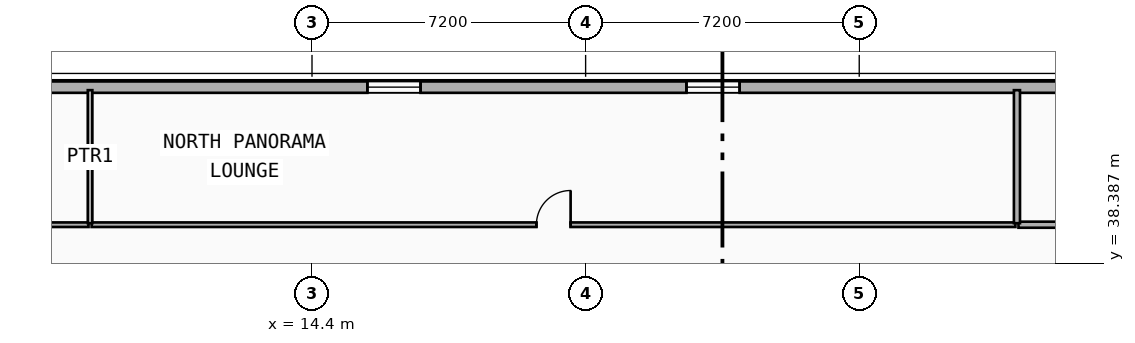
"""IFC4 building model, lengths in metres.
Left out: names, types, materials, properties, quantities, classifications, styles, units other than length and angle.
Written with IfcOpenShell. Run it as: python <this file> out.ifc"""

import sys

from ifc_helpers import new_model, si_unit, direction, frame, frame_2d, origin, place, context, subcontext, project, spatial, rectangle, extrude, element, fill, save


model = new_model("IFC4")
c1 = context("Model", 3, precision=1e-05, world=origin(), true_north=direction((0.0, 1.0)))
c2 = subcontext(c1, "Body", "Model", "MODEL_VIEW")
j1 = project(units=[si_unit("LENGTHUNIT", "METRE"), si_unit("PLANEANGLEUNIT", "RADIAN")], contexts=[c1])
p1 = place(None, origin())
s1 = spatial("IfcSite", under=j1, at=p1, CompositionType="ELEMENT")
p2 = place(p1, origin())
s2 = spatial("IfcBuilding", under=s1, at=p2, CompositionType="ELEMENT")
p3 = place(p2, frame((0.0, 0.0, 104.8)))
s3 = spatial("IfcBuildingStorey", under=s2, at=p3, CompositionType="ELEMENT", Elevation=104.8)
p4 = place(p3, frame((4.2, 43.02, 0.0), z_axis=(0.0, 0.0, 1.0), x_axis=(1.0, 0.0, 0.0)))
e1 = element("IfcWall", 1, at=p4, inside=s3, PredefinedType="SOLIDWALL", context=c2, shape_type="SweptSolid", body=[
    extrude(rectangle(XDim=49.2, YDim=0.3, at=frame_2d((24.6, 0.0))), origin(), (0.0, 0.0, 1.0), 3.24),
])
p5 = place(p4, frame((11.657, 0.0, 0.85)))
e2 = element("IfcOpeningElement", 2, at=p5, cuts=e1, PredefinedType="OPENING", context=c2, shape_type="SweptSolid", body=[
    extrude(rectangle(XDim=1.4, YDim=1.8, at=frame_2d((0.7, 0.9))), frame((0.0, 0.16, 0.0), z_axis=(0.0, -1.0, 0.0), x_axis=(1.0, 0.0, 0.0)), (0.0, 0.0, 1.0), 0.32),
])
p6 = place(p4, frame((20.053, 0.0, 0.85)))
e3 = element("IfcOpeningElement", 3, at=p6, cuts=e1, PredefinedType="OPENING", context=c2, shape_type="SweptSolid", body=[
    extrude(rectangle(XDim=1.4, YDim=1.8, at=frame_2d((0.7, 0.9))), frame((0.0, 0.16, 0.0), z_axis=(0.0, -1.0, 0.0), x_axis=(1.0, 0.0, 0.0)), (0.0, 0.0, 1.0), 0.32),
])
p7 = place(p4, frame((29.789, 0.0, 0.85)))
e4 = element("IfcOpeningElement", 4, at=p7, cuts=e1, PredefinedType="OPENING", context=c2, shape_type="SweptSolid", body=[
    extrude(rectangle(XDim=1.4, YDim=1.8, at=frame_2d((0.7, 0.9))), frame((0.0, 0.16, 0.0), z_axis=(0.0, -1.0, 0.0), x_axis=(1.0, 0.0, 0.0)), (0.0, 0.0, 1.0), 0.32),
])
p8 = place(p4, frame((31.928, 0.0, 0.85)))
e5 = element("IfcOpeningElement", 5, at=p8, cuts=e1, PredefinedType="OPENING", context=c2, shape_type="SweptSolid", body=[
    extrude(rectangle(XDim=1.4, YDim=1.8, at=frame_2d((0.7, 0.9))), frame((0.0, 0.16, 0.0), z_axis=(0.0, -1.0, 0.0), x_axis=(1.0, 0.0, 0.0)), (0.0, 0.0, 1.0), 0.32),
])
p9 = place(p4, frame((39.382, 0.0, 0.85)))
e6 = element("IfcOpeningElement", 6, at=p9, cuts=e1, PredefinedType="OPENING", context=c2, shape_type="SweptSolid", body=[
    extrude(rectangle(XDim=1.4, YDim=1.8, at=frame_2d((0.7, 0.9))), frame((0.0, 0.16, 0.0), z_axis=(0.0, -1.0, 0.0), x_axis=(1.0, 0.0, 0.0)), (0.0, 0.0, 1.0), 0.32),
])
p10 = place(p4, frame((41.741, 0.0, 0.85)))
e7 = element("IfcOpeningElement", 7, at=p10, cuts=e1, PredefinedType="OPENING", context=c2, shape_type="SweptSolid", body=[
    extrude(rectangle(XDim=1.4, YDim=1.8, at=frame_2d((0.7, 0.9))), frame((0.0, 0.16, 0.0), z_axis=(0.0, -1.0, 0.0), x_axis=(1.0, 0.0, 0.0)), (0.0, 0.0, 1.0), 0.32),
])
p11 = place(p4, frame((47.115, 0.0, 0.85)))
e8 = element("IfcOpeningElement", 8, at=p11, cuts=e1, PredefinedType="OPENING", context=c2, shape_type="SweptSolid", body=[
    extrude(rectangle(XDim=1.4, YDim=1.8, at=frame_2d((0.7, 0.9))), frame((0.0, 0.16, 0.0), z_axis=(0.0, -1.0, 0.0), x_axis=(1.0, 0.0, 0.0)), (0.0, 0.0, 1.0), 0.32),
])
p12 = place(p3, frame((0.26, 39.4, 0.0), z_axis=(0.0, 0.0, 1.0), x_axis=(1.0, 0.0, 0.0)))
e9 = element("IfcWall", 9, at=p12, inside=s3, PredefinedType="PARTITIONING", context=c2, shape_type="SweptSolid", body=[
    extrude(rectangle(XDim=8.26, YDim=0.12, at=frame_2d((4.13, 0.0))), origin(), (0.0, 0.0, 1.0), 3.24),
])
p13 = place(p12, frame((3.68, 0.0, 0.0)))
e10 = element("IfcOpeningElement", 10, at=p13, cuts=e9, PredefinedType="OPENING", context=c2, shape_type="SweptSolid", body=[
    extrude(rectangle(XDim=0.9, YDim=2.1, at=frame_2d((0.45, 1.05))), frame((0.0, 0.07, 0.0), z_axis=(0.0, -1.0, 0.0), x_axis=(1.0, 0.0, 0.0)), (0.0, 0.0, 1.0), 0.14),
])
p14 = place(p3, frame((8.6, 39.4, 0.0), z_axis=(0.0, 0.0, 1.0), x_axis=(1.0, 0.0, 0.0)))
e11 = element("IfcWall", 11, at=p14, inside=s3, PredefinedType="PARTITIONING", context=c2, shape_type="SweptSolid", body=[
    extrude(rectangle(XDim=24.31, YDim=0.12, at=frame_2d((12.155, 0.0))), origin(), (0.0, 0.0, 1.0), 3.24),
])
p15 = place(p14, frame((11.705, 0.0, 0.0)))
e12 = element("IfcOpeningElement", 12, at=p15, cuts=e11, PredefinedType="OPENING", context=c2, shape_type="SweptSolid", body=[
    extrude(rectangle(XDim=0.9, YDim=2.1, at=frame_2d((0.45, 1.05))), frame((0.0, 0.07, 0.0), z_axis=(0.0, -1.0, 0.0), x_axis=(1.0, 0.0, 0.0)), (0.0, 0.0, 1.0), 0.14),
])
p16 = place(p3, frame((32.99, 39.4, 0.0), z_axis=(0.0, 0.0, 1.0), x_axis=(1.0, 0.0, 0.0)))
e13 = element("IfcWall", 13, at=p16, inside=s3, PredefinedType="PARTITIONING", context=c2, shape_type="SweptSolid", body=[
    extrude(rectangle(XDim=5.537, YDim=0.16, at=frame_2d((2.769, 0.0))), origin(), (0.0, 0.0, 1.0), 3.24),
])
p17 = place(p16, frame((2.269, 0.0, 0.0)))
e14 = element("IfcOpeningElement", 14, at=p17, cuts=e13, PredefinedType="OPENING", context=c2, shape_type="SweptSolid", body=[
    extrude(rectangle(XDim=1.0, YDim=2.15, at=frame_2d((0.5, 1.075))), frame((0.0, 0.09, 0.0), z_axis=(0.0, -1.0, 0.0), x_axis=(1.0, 0.0, 0.0)), (0.0, 0.0, 1.0), 0.18),
])
p18 = place(p3, frame((8.56, 39.44, 0.0), z_axis=(0.0, 0.0, 1.0), x_axis=(0.0, 1.0, 0.0)))
e15 = element("IfcWall", 15, at=p18, inside=s3, PredefinedType="PARTITIONING", context=c2, shape_type="SweptSolid", body=[
    extrude(rectangle(XDim=3.5, YDim=0.12, at=frame_2d((1.75, 0.0))), origin(), (0.0, 0.0, 1.0), 3.24),
])
p19 = place(p3, frame((32.95, 39.44, 0.0), z_axis=(0.0, 0.0, 1.0), x_axis=(0.0, 1.0, 0.0)))
e16 = element("IfcWall", 16, at=p19, inside=s3, PredefinedType="PARTITIONING", context=c2, shape_type="SweptSolid", body=[
    extrude(rectangle(XDim=3.5, YDim=0.16, at=frame_2d((1.75, 0.0))), origin(), (0.0, 0.0, 1.0), 3.24),
])
p20 = place(p5, origin())
e17 = element("IfcWindow", 17, at=p20, inside=s3, PartitioningType="SINGLE_PANEL", PredefinedType="WINDOW", context=c2, shape_type="SweptSolid", body=[
    extrude(rectangle(XDim=1.4, YDim=1.8, at=frame_2d((0.7, 0.9))), frame((0.0, 0.03, 0.0), z_axis=(0.0, -1.0, 0.0), x_axis=(1.0, 0.0, 0.0)), (0.0, 0.0, 1.0), 0.06),
])
fill(e2, e17)
p21 = place(p6, origin())
e18 = element("IfcWindow", 18, at=p21, inside=s3, PartitioningType="SINGLE_PANEL", PredefinedType="WINDOW", context=c2, shape_type="SweptSolid", body=[
    extrude(rectangle(XDim=1.4, YDim=1.8, at=frame_2d((0.7, 0.9))), frame((0.0, 0.03, 0.0), z_axis=(0.0, -1.0, 0.0), x_axis=(1.0, 0.0, 0.0)), (0.0, 0.0, 1.0), 0.06),
])
fill(e3, e18)
p22 = place(p15, origin())
e19 = element("IfcDoor", 19, at=p22, inside=s3, OperationType="SINGLE_SWING_RIGHT", PredefinedType="DOOR", context=c2, shape_type="SweptSolid", body=[
    extrude(rectangle(XDim=0.9, YDim=2.1, at=frame_2d((0.45, 1.05))), frame((0.0, 0.025, 0.0), z_axis=(0.0, -1.0, 0.0), x_axis=(1.0, 0.0, 0.0)), (0.0, 0.0, 1.0), 0.05),
])
fill(e12, e19)
save(model, sys.argv[1])
